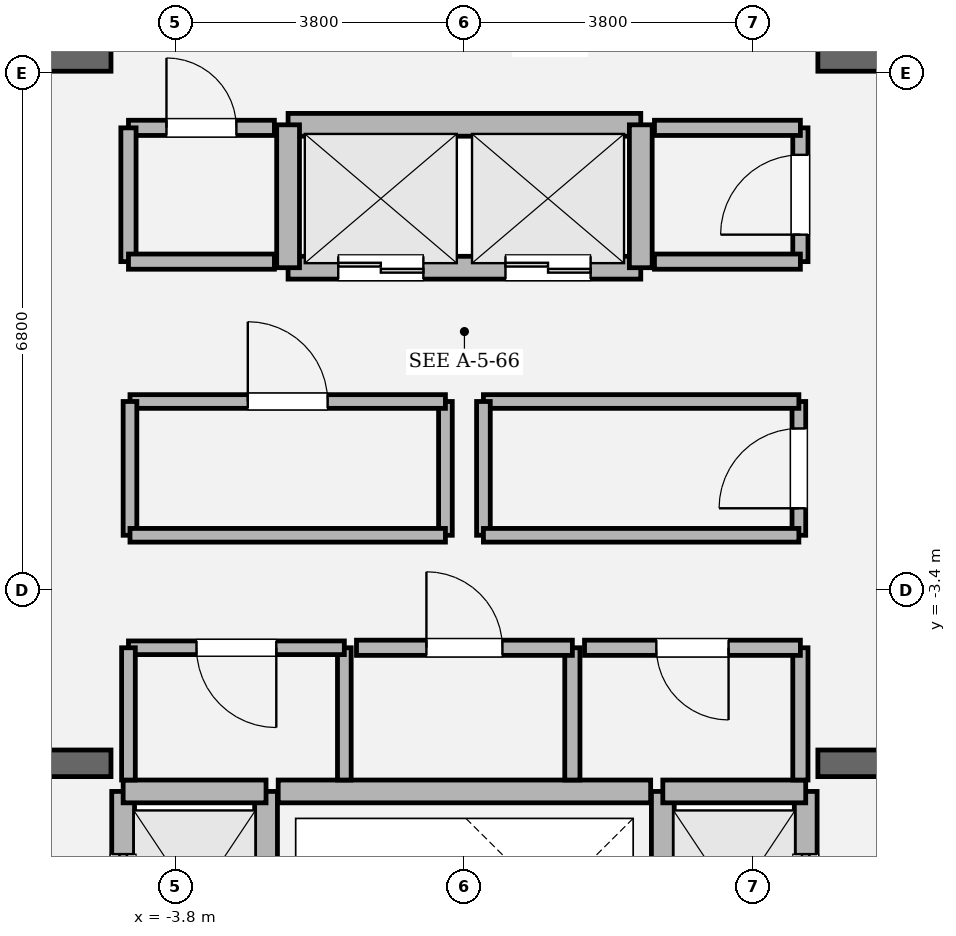
"""IFC4 building model, lengths in metres.
Left out: names, types, materials, properties, quantities, classifications, styles, units other than length and angle.
Written with IfcOpenShell. Run it as: python <this file> out.ifc"""

import sys

from ifc_helpers import new_model, si_unit, direction, frame, frame_2d, origin, place, context, subcontext, project, spatial, rectangle, extrude, element, fill, save


model = new_model("IFC4")
c1 = context("Model", 3, precision=1e-05, world=origin(), true_north=direction((0.0, 1.0)))
c2 = subcontext(c1, "Body", "Model", "MODEL_VIEW")
j1 = project(units=[si_unit("LENGTHUNIT", "METRE"), si_unit("PLANEANGLEUNIT", "RADIAN")], contexts=[c1])
p1 = place(None, origin())
s1 = spatial("IfcSite", under=j1, at=p1, CompositionType="ELEMENT")
p2 = place(p1, origin())
s2 = spatial("IfcBuilding", under=s1, at=p2, CompositionType="ELEMENT")
p3 = place(p2, frame((0.0, 0.0, 317.4)))
s3 = spatial("IfcBuildingStorey", under=s2, at=p3, CompositionType="ELEMENT", Elevation=317.4)
p4 = place(p3, frame((-9.975, -5.68, 0.0), z_axis=(0.0, 0.0, 1.0), x_axis=(1.0, 0.0, 0.0)))
e1 = element("IfcWall", 1, at=p4, inside=s3, PredefinedType="SOLIDWALL", context=c2, shape_type="SweptSolid", body=[
    extrude(rectangle(XDim=5.325, YDim=0.35, at=frame_2d((2.663, 0.0))), origin(), (0.0, 0.0, 1.0), 4.2),
])
p5 = place(p4, frame((1.435, 0.0, 0.0)))
e2 = element("IfcOpeningElement", 2, at=p5, cuts=e1, PredefinedType="OPENING", context=c2, shape_type="SweptSolid", body=[
    extrude(rectangle(XDim=1.18, YDim=2.2, at=frame_2d((0.59, 1.1))), frame((0.0, 0.185, 0.0), z_axis=(0.0, -1.0, 0.0), x_axis=(1.0, 0.0, 0.0)), (0.0, 0.0, 1.0), 0.37),
])
p6 = place(p3, frame((4.65, -5.68, 0.0), z_axis=(0.0, 0.0, 1.0), x_axis=(1.0, 0.0, 0.0)))
e3 = element("IfcWall", 3, at=p6, inside=s3, PredefinedType="SOLIDWALL", context=c2, shape_type="SweptSolid", body=[
    extrude(rectangle(XDim=5.325, YDim=0.35, at=frame_2d((2.663, 0.0))), origin(), (0.0, 0.0, 1.0), 4.2),
])
p7 = place(p6, frame((2.71, 0.0, 0.0)))
e4 = element("IfcOpeningElement", 4, at=p7, cuts=e3, PredefinedType="OPENING", context=c2, shape_type="SweptSolid", body=[
    extrude(rectangle(XDim=1.18, YDim=2.2, at=frame_2d((0.59, 1.1))), frame((0.0, 0.185, 0.0), z_axis=(0.0, -1.0, 0.0), x_axis=(1.0, 0.0, 0.0)), (0.0, 0.0, 1.0), 0.37),
])
for number, where, z_axis, x_axis in (
    (5, (-9.975, 3.6, 0.0), (0.0, 0.0, 1.0), (1.0, 0.0, 0.0)),
    (6, (4.65, 3.6, 0.0), (0.0, 0.0, 1.0), (1.0, 0.0, 0.0)),
):
    element("IfcWall", number, at=place(p3, frame(where, z_axis=z_axis, x_axis=x_axis)), inside=s3, PredefinedType="SOLIDWALL", context=c2, shape_type="SweptSolid", body=[
        extrude(rectangle(XDim=5.325, YDim=0.35, at=frame_2d((2.663, 0.0))), origin(), (0.0, 0.0, 1.0), 4.2),
    ])
p8 = place(p3, frame((-4.49, -8.82, 0.0), z_axis=(0.0, 0.0, 1.0), x_axis=(0.0, 1.0, 0.0)))
e7 = element("IfcWall", 7, at=p8, inside=s3, PredefinedType="SOLIDWALL", context=c2, shape_type="SweptSolid", body=[
    extrude(rectangle(XDim=2.77, YDim=0.3, at=frame_2d((1.385, 0.0))), origin(), (0.0, 0.0, 1.0), 4.0),
])
p9 = place(p8, frame((0.825, 0.0, 0.0)))
e8 = element("IfcOpeningElement", 8, at=p9, cuts=e7, PredefinedType="OPENING", context=c2, shape_type="SweptSolid", body=[
    extrude(rectangle(XDim=1.12, YDim=2.25, at=frame_2d((0.56, 1.125))), frame((0.0, 0.16, 0.0), z_axis=(0.0, -1.0, 0.0), x_axis=(1.0, 0.0, 0.0)), (0.0, 0.0, 1.0), 0.32),
])
p10 = place(p3, frame((-2.61, -8.82, 0.0), z_axis=(0.0, 0.0, 1.0), x_axis=(0.0, 1.0, 0.0)))
e9 = element("IfcWall", 9, at=p10, inside=s3, PredefinedType="SOLIDWALL", context=c2, shape_type="SweptSolid", body=[
    extrude(rectangle(XDim=2.77, YDim=0.3, at=frame_2d((1.385, 0.0))), origin(), (0.0, 0.0, 1.0), 4.0),
])
p11 = place(p3, frame((-4.49, -6.05, 0.0), z_axis=(0.0, 0.0, 1.0), x_axis=(1.0, 0.0, 0.0)))
e10 = element("IfcWall", 10, at=p11, inside=s3, PredefinedType="SOLIDWALL", context=c2, shape_type="SweptSolid", body=[
    extrude(rectangle(XDim=1.88, YDim=0.3, at=frame_2d((0.94, 0.0))), origin(), (0.0, 0.0, 1.0), 4.0),
])
p12 = place(p3, frame((4.49, -8.82, 0.0), z_axis=(0.0, 0.0, 1.0), x_axis=(0.0, 1.0, 0.0)))
e11 = element("IfcWall", 11, at=p12, inside=s3, PredefinedType="SOLIDWALL", context=c2, shape_type="SweptSolid", body=[
    extrude(rectangle(XDim=2.77, YDim=0.3, at=frame_2d((1.385, 0.0))), origin(), (0.0, 0.0, 1.0), 4.0),
])
p13 = place(p12, frame((0.825, 0.0, 0.0)))
e12 = element("IfcOpeningElement", 12, at=p13, cuts=e11, PredefinedType="OPENING", context=c2, shape_type="SweptSolid", body=[
    extrude(rectangle(XDim=1.12, YDim=2.25, at=frame_2d((0.56, 1.125))), frame((0.0, 0.16, 0.0), z_axis=(0.0, -1.0, 0.0), x_axis=(1.0, 0.0, 0.0)), (0.0, 0.0, 1.0), 0.32),
])
p14 = place(p3, frame((2.61, -8.82, 0.0), z_axis=(0.0, 0.0, 1.0), x_axis=(0.0, 1.0, 0.0)))
e13 = element("IfcWall", 13, at=p14, inside=s3, PredefinedType="SOLIDWALL", context=c2, shape_type="SweptSolid", body=[
    extrude(rectangle(XDim=2.77, YDim=0.3, at=frame_2d((1.385, 0.0))), origin(), (0.0, 0.0, 1.0), 4.0),
])
p15 = place(p3, frame((2.61, -6.05, 0.0), z_axis=(0.0, 0.0, 1.0), x_axis=(1.0, 0.0, 0.0)))
e14 = element("IfcWall", 14, at=p15, inside=s3, PredefinedType="SOLIDWALL", context=c2, shape_type="SweptSolid", body=[
    extrude(rectangle(XDim=1.88, YDim=0.3, at=frame_2d((0.94, 0.0))), origin(), (0.0, 0.0, 1.0), 4.0),
])
p16 = place(p3, frame((-2.32, 0.84, 0.0), z_axis=(0.0, 0.0, 1.0), x_axis=(1.0, 0.0, 0.0)))
e15 = element("IfcWall", 15, at=p16, inside=s3, PredefinedType="SOLIDWALL", context=c2, shape_type="SweptSolid", body=[
    extrude(rectangle(XDim=4.64, YDim=0.3, at=frame_2d((2.32, 0.0))), origin(), (0.0, 0.0, 1.0), 4.0),
])
p17 = place(p16, frame((0.66, 0.0, 0.0)))
e16 = element("IfcOpeningElement", 16, at=p17, cuts=e15, PredefinedType="OPENING", context=c2, shape_type="SweptSolid", body=[
    extrude(rectangle(XDim=1.12, YDim=2.25, at=frame_2d((0.56, 1.125))), frame((0.0, 0.16, 0.0), z_axis=(0.0, -1.0, 0.0), x_axis=(1.0, 0.0, 0.0)), (0.0, 0.0, 1.0), 0.32),
])
p18 = place(p16, frame((2.86, 0.0, 0.0)))
e17 = element("IfcOpeningElement", 17, at=p18, cuts=e15, PredefinedType="OPENING", context=c2, shape_type="SweptSolid", body=[
    extrude(rectangle(XDim=1.12, YDim=2.25, at=frame_2d((0.56, 1.125))), frame((0.0, 0.16, 0.0), z_axis=(0.0, -1.0, 0.0), x_axis=(1.0, 0.0, 0.0)), (0.0, 0.0, 1.0), 0.32),
])
p19 = place(p3, frame((-2.32, 2.72, 0.0), z_axis=(0.0, 0.0, 1.0), x_axis=(1.0, 0.0, 0.0)))
e18 = element("IfcWall", 18, at=p19, inside=s3, PredefinedType="SOLIDWALL", context=c2, shape_type="SweptSolid", body=[
    extrude(rectangle(XDim=4.64, YDim=0.3, at=frame_2d((2.32, 0.0))), origin(), (0.0, 0.0, 1.0), 4.0),
])
for number, where, z_axis, x_axis in (
    (19, (-2.32, 0.84, 0.0), (0.0, 0.0, 1.0), (0.0, 1.0, 0.0)),
    (20, (2.32, 0.84, 0.0), (0.0, 0.0, 1.0), (0.0, 1.0, 0.0)),
):
    element("IfcWall", number, at=place(p3, frame(where, z_axis=z_axis, x_axis=x_axis)), inside=s3, PredefinedType="SOLIDWALL", context=c2, shape_type="SweptSolid", body=[
        extrude(rectangle(XDim=1.88, YDim=0.3, at=frame_2d((0.94, 0.0))), origin(), (0.0, 0.0, 1.0), 4.0),
    ])
p20 = place(p3, frame((-2.45, -6.05, 0.0), z_axis=(0.0, 0.0, 1.0), x_axis=(1.0, 0.0, 0.0)))
e21 = element("IfcWall", 21, at=p20, inside=s3, PredefinedType="SOLIDWALL", context=c2, shape_type="SweptSolid", body=[
    extrude(rectangle(XDim=4.9, YDim=0.3, at=frame_2d((2.45, 0.0))), origin(), (0.0, 0.0, 1.0), 4.0),
])
p21 = place(p3, frame((-1.58, -5.9, 0.0), z_axis=(0.0, 0.0, 1.0), x_axis=(0.0, 1.0, 0.0)))
e22 = element("IfcWall", 22, at=p21, inside=s3, PredefinedType="PARTITIONING", context=c2, shape_type="SweptSolid", body=[
    extrude(rectangle(XDim=1.74, YDim=0.18, at=frame_2d((0.87, 0.0))), origin(), (0.0, 0.0, 1.0), 4.0),
])
p22 = place(p3, frame((-1.58, -4.16, 0.0), z_axis=(0.0, 0.0, 1.0), x_axis=(-1.0, 0.0, 0.0)))
e23 = element("IfcWall", 23, at=p22, inside=s3, PredefinedType="PARTITIONING", context=c2, shape_type="SweptSolid", body=[
    extrude(rectangle(XDim=2.84, YDim=0.18, at=frame_2d((1.42, 0.0))), origin(), (0.0, 0.0, 1.0), 4.0),
])
p23 = place(p22, frame((0.895, 0.0, 0.0)))
e24 = element("IfcOpeningElement", 24, at=p23, cuts=e23, PredefinedType="OPENING", context=c2, shape_type="SweptSolid", body=[
    extrude(rectangle(XDim=1.05, YDim=2.2, at=frame_2d((0.525, 1.1))), frame((0.0, 0.1, 0.0), z_axis=(0.0, -1.0, 0.0), x_axis=(1.0, 0.0, 0.0)), (0.0, 0.0, 1.0), 0.2),
])
p24 = place(p3, frame((-4.42, -4.16, 0.0), z_axis=(0.0, 0.0, 1.0), x_axis=(0.0, -1.0, 0.0)))
e25 = element("IfcWall", 25, at=p24, inside=s3, PredefinedType="PARTITIONING", context=c2, shape_type="SweptSolid", body=[
    extrude(rectangle(XDim=1.74, YDim=0.18, at=frame_2d((0.87, 0.0))), origin(), (0.0, 0.0, 1.0), 4.0),
])
p25 = place(p3, frame((1.42, -5.9, 0.0), z_axis=(0.0, 0.0, 1.0), x_axis=(0.0, 1.0, 0.0)))
e26 = element("IfcWall", 26, at=p25, inside=s3, PredefinedType="SOLIDWALL", context=c2, shape_type="SweptSolid", body=[
    extrude(rectangle(XDim=1.74, YDim=0.2, at=frame_2d((0.87, 0.0))), origin(), (0.0, 0.0, 1.0), 4.0),
])
p26 = place(p3, frame((1.42, -4.16, 0.0), z_axis=(0.0, 0.0, 1.0), x_axis=(-1.0, 0.0, 0.0)))
e27 = element("IfcWall", 27, at=p26, inside=s3, PredefinedType="SOLIDWALL", context=c2, shape_type="SweptSolid", body=[
    extrude(rectangle(XDim=2.84, YDim=0.2, at=frame_2d((1.42, 0.0))), origin(), (0.0, 0.0, 1.0), 4.0),
])
p27 = place(p26, frame((0.92, 0.0, 0.0)))
e28 = element("IfcOpeningElement", 28, at=p27, cuts=e27, PredefinedType="OPENING", context=c2, shape_type="SweptSolid", body=[
    extrude(rectangle(XDim=1.0, YDim=2.15, at=frame_2d((0.5, 1.075))), frame((0.0, 0.11, 0.0), z_axis=(0.0, -1.0, 0.0), x_axis=(1.0, 0.0, 0.0)), (0.0, 0.0, 1.0), 0.22),
])
p28 = place(p3, frame((4.42, -5.9, 0.0), z_axis=(0.0, 0.0, 1.0), x_axis=(0.0, 1.0, 0.0)))
e29 = element("IfcWall", 29, at=p28, inside=s3, PredefinedType="SOLIDWALL", context=c2, shape_type="SweptSolid", body=[
    extrude(rectangle(XDim=1.74, YDim=0.2, at=frame_2d((0.87, 0.0))), origin(), (0.0, 0.0, 1.0), 4.0),
])
p29 = place(p3, frame((4.42, -4.16, 0.0), z_axis=(0.0, 0.0, 1.0), x_axis=(-1.0, 0.0, 0.0)))
e30 = element("IfcWall", 30, at=p29, inside=s3, PredefinedType="SOLIDWALL", context=c2, shape_type="SweptSolid", body=[
    extrude(rectangle(XDim=2.84, YDim=0.2, at=frame_2d((1.42, 0.0))), origin(), (0.0, 0.0, 1.0), 4.0),
])
p30 = place(p29, frame((0.945, 0.0, 0.0)))
e31 = element("IfcOpeningElement", 31, at=p30, cuts=e30, PredefinedType="OPENING", context=c2, shape_type="SweptSolid", body=[
    extrude(rectangle(XDim=0.95, YDim=2.15, at=frame_2d((0.475, 1.075))), frame((0.0, 0.11, 0.0), z_axis=(0.0, -1.0, 0.0), x_axis=(1.0, 0.0, 0.0)), (0.0, 0.0, 1.0), 0.22),
])
p31 = place(p3, frame((-0.25, -2.68, 0.0), z_axis=(0.0, 0.0, 1.0), x_axis=(0.0, 1.0, 0.0)))
e32 = element("IfcWall", 32, at=p31, inside=s3, PredefinedType="PARTITIONING", context=c2, shape_type="SweptSolid", body=[
    extrude(rectangle(XDim=1.76, YDim=0.18, at=frame_2d((0.88, 0.0))), origin(), (0.0, 0.0, 1.0), 4.0),
])
p32 = place(p3, frame((-0.25, -0.92, 0.0), z_axis=(0.0, 0.0, 1.0), x_axis=(-1.0, 0.0, 0.0)))
e33 = element("IfcWall", 33, at=p32, inside=s3, PredefinedType="PARTITIONING", context=c2, shape_type="SweptSolid", body=[
    extrude(rectangle(XDim=4.15, YDim=0.18, at=frame_2d((2.075, 0.0))), origin(), (0.0, 0.0, 1.0), 4.0),
])
p33 = place(p32, frame((1.55, 0.0, 0.0)))
e34 = element("IfcOpeningElement", 34, at=p33, cuts=e33, PredefinedType="OPENING", context=c2, shape_type="SweptSolid", body=[
    extrude(rectangle(XDim=1.05, YDim=2.2, at=frame_2d((0.525, 1.1))), frame((0.0, 0.1, 0.0), z_axis=(0.0, -1.0, 0.0), x_axis=(1.0, 0.0, 0.0)), (0.0, 0.0, 1.0), 0.2),
])
p34 = place(p3, frame((-4.4, -0.92, 0.0), z_axis=(0.0, 0.0, 1.0), x_axis=(0.0, -1.0, 0.0)))
e35 = element("IfcWall", 35, at=p34, inside=s3, PredefinedType="PARTITIONING", context=c2, shape_type="SweptSolid", body=[
    extrude(rectangle(XDim=1.76, YDim=0.18, at=frame_2d((0.88, 0.0))), origin(), (0.0, 0.0, 1.0), 4.0),
])
p35 = place(p3, frame((-4.4, -2.68, 0.0), z_axis=(0.0, 0.0, 1.0), x_axis=(1.0, 0.0, 0.0)))
e36 = element("IfcWall", 36, at=p35, inside=s3, PredefinedType="PARTITIONING", context=c2, shape_type="SweptSolid", body=[
    extrude(rectangle(XDim=4.15, YDim=0.18, at=frame_2d((2.075, 0.0))), origin(), (0.0, 0.0, 1.0), 4.0),
])
p36 = place(p3, frame((4.4, -2.68, 0.0), z_axis=(0.0, 0.0, 1.0), x_axis=(0.0, 1.0, 0.0)))
e37 = element("IfcWall", 37, at=p36, inside=s3, PredefinedType="PARTITIONING", context=c2, shape_type="SweptSolid", body=[
    extrude(rectangle(XDim=1.76, YDim=0.18, at=frame_2d((0.88, 0.0))), origin(), (0.0, 0.0, 1.0), 4.0),
])
p37 = place(p36, frame((0.355, 0.0, 0.0)))
e38 = element("IfcOpeningElement", 38, at=p37, cuts=e37, PredefinedType="OPENING", context=c2, shape_type="SweptSolid", body=[
    extrude(rectangle(XDim=1.05, YDim=2.2, at=frame_2d((0.525, 1.1))), frame((0.0, 0.1, 0.0), z_axis=(0.0, -1.0, 0.0), x_axis=(1.0, 0.0, 0.0)), (0.0, 0.0, 1.0), 0.2),
])
p38 = place(p3, frame((4.4, -0.92, 0.0), z_axis=(0.0, 0.0, 1.0), x_axis=(-1.0, 0.0, 0.0)))
e39 = element("IfcWall", 39, at=p38, inside=s3, PredefinedType="PARTITIONING", context=c2, shape_type="SweptSolid", body=[
    extrude(rectangle(XDim=4.15, YDim=0.18, at=frame_2d((2.075, 0.0))), origin(), (0.0, 0.0, 1.0), 4.0),
])
p39 = place(p3, frame((0.25, -0.92, 0.0), z_axis=(0.0, 0.0, 1.0), x_axis=(0.0, -1.0, 0.0)))
e40 = element("IfcWall", 40, at=p39, inside=s3, PredefinedType="PARTITIONING", context=c2, shape_type="SweptSolid", body=[
    extrude(rectangle(XDim=1.76, YDim=0.18, at=frame_2d((0.88, 0.0))), origin(), (0.0, 0.0, 1.0), 4.0),
])
p40 = place(p3, frame((0.25, -2.68, 0.0), z_axis=(0.0, 0.0, 1.0), x_axis=(1.0, 0.0, 0.0)))
e41 = element("IfcWall", 41, at=p40, inside=s3, PredefinedType="PARTITIONING", context=c2, shape_type="SweptSolid", body=[
    extrude(rectangle(XDim=4.15, YDim=0.18, at=frame_2d((2.075, 0.0))), origin(), (0.0, 0.0, 1.0), 4.0),
])
p41 = place(p3, frame((-2.5, 2.68, 0.0), z_axis=(0.0, 0.0, 1.0), x_axis=(-1.0, 0.0, 0.0)))
e42 = element("IfcWall", 42, at=p41, inside=s3, PredefinedType="SOLIDWALL", context=c2, shape_type="SweptSolid", body=[
    extrude(rectangle(XDim=1.92, YDim=0.2, at=frame_2d((0.96, 0.0))), origin(), (0.0, 0.0, 1.0), 4.0),
])
p42 = place(p41, frame((0.5, 0.0, 0.0)))
e43 = element("IfcOpeningElement", 43, at=p42, cuts=e42, PredefinedType="OPENING", context=c2, shape_type="SweptSolid", body=[
    extrude(rectangle(XDim=0.92, YDim=2.1, at=frame_2d((0.46, 1.05))), frame((0.0, 0.11, 0.0), z_axis=(0.0, -1.0, 0.0), x_axis=(1.0, 0.0, 0.0)), (0.0, 0.0, 1.0), 0.22),
])
p43 = place(p3, frame((-4.42, 2.68, 0.0), z_axis=(0.0, 0.0, 1.0), x_axis=(0.0, -1.0, 0.0)))
e44 = element("IfcWall", 44, at=p43, inside=s3, PredefinedType="SOLIDWALL", context=c2, shape_type="SweptSolid", body=[
    extrude(rectangle(XDim=1.76, YDim=0.2, at=frame_2d((0.88, 0.0))), origin(), (0.0, 0.0, 1.0), 4.0),
])
p44 = place(p3, frame((-4.42, 0.92, 0.0), z_axis=(0.0, 0.0, 1.0), x_axis=(1.0, 0.0, 0.0)))
e45 = element("IfcWall", 45, at=p44, inside=s3, PredefinedType="SOLIDWALL", context=c2, shape_type="SweptSolid", body=[
    extrude(rectangle(XDim=1.92, YDim=0.2, at=frame_2d((0.96, 0.0))), origin(), (0.0, 0.0, 1.0), 4.0),
])
p45 = place(p3, frame((4.42, 0.92, 0.0), z_axis=(0.0, 0.0, 1.0), x_axis=(0.0, 1.0, 0.0)))
e46 = element("IfcWall", 46, at=p45, inside=s3, PredefinedType="SOLIDWALL", context=c2, shape_type="SweptSolid", body=[
    extrude(rectangle(XDim=1.76, YDim=0.2, at=frame_2d((0.88, 0.0))), origin(), (0.0, 0.0, 1.0), 4.0),
])
p46 = place(p45, frame((0.355, 0.0, 0.0)))
e47 = element("IfcOpeningElement", 47, at=p46, cuts=e46, PredefinedType="OPENING", context=c2, shape_type="SweptSolid", body=[
    extrude(rectangle(XDim=1.05, YDim=2.2, at=frame_2d((0.525, 1.1))), frame((0.0, 0.11, 0.0), z_axis=(0.0, -1.0, 0.0), x_axis=(1.0, 0.0, 0.0)), (0.0, 0.0, 1.0), 0.22),
])
for number, where, z_axis, x_axis in (
    (48, (4.42, 2.68, 0.0), (0.0, 0.0, 1.0), (-1.0, 0.0, 0.0)),
    (49, (2.5, 0.92, 0.0), (0.0, 0.0, 1.0), (1.0, 0.0, 0.0)),
):
    element("IfcWall", number, at=place(p3, frame(where, z_axis=z_axis, x_axis=x_axis)), inside=s3, PredefinedType="SOLIDWALL", context=c2, shape_type="SweptSolid", body=[
        extrude(rectangle(XDim=1.92, YDim=0.2, at=frame_2d((0.96, 0.0))), origin(), (0.0, 0.0, 1.0), 4.0),
    ])
p47 = place(p9, origin())
e50 = element("IfcDoor", 50, at=p47, inside=s3, OperationType="SLIDING_TO_LEFT", PredefinedType="DOOR", context=c2, shape_type="SweptSolid", body=[
    extrude(rectangle(XDim=1.12, YDim=2.25, at=frame_2d((0.56, 1.125))), frame((0.0, 0.025, 0.0), z_axis=(0.0, -1.0, 0.0), x_axis=(1.0, 0.0, 0.0)), (0.0, 0.0, 1.0), 0.05),
])
fill(e8, e50)
p48 = place(p13, origin())
e51 = element("IfcDoor", 51, at=p48, inside=s3, OperationType="SLIDING_TO_RIGHT", PredefinedType="DOOR", context=c2, shape_type="SweptSolid", body=[
    extrude(rectangle(XDim=1.12, YDim=2.25, at=frame_2d((0.56, 1.125))), frame((0.0, 0.025, 0.0), z_axis=(0.0, -1.0, 0.0), x_axis=(1.0, 0.0, 0.0)), (0.0, 0.0, 1.0), 0.05),
])
fill(e12, e51)
p49 = place(p17, origin())
e52 = element("IfcDoor", 52, at=p49, inside=s3, OperationType="DOUBLE_DOOR_SLIDING", PredefinedType="DOOR", context=c2, shape_type="SweptSolid", body=[
    extrude(rectangle(XDim=1.12, YDim=2.25, at=frame_2d((0.56, 1.125))), frame((0.0, 0.025, 0.0), z_axis=(0.0, -1.0, 0.0), x_axis=(1.0, 0.0, 0.0)), (0.0, 0.0, 1.0), 0.05),
])
fill(e16, e52)
p50 = place(p18, origin())
e53 = element("IfcDoor", 53, at=p50, inside=s3, OperationType="DOUBLE_DOOR_SLIDING", PredefinedType="DOOR", context=c2, shape_type="SweptSolid", body=[
    extrude(rectangle(XDim=1.12, YDim=2.25, at=frame_2d((0.56, 1.125))), frame((0.0, 0.025, 0.0), z_axis=(0.0, -1.0, 0.0), x_axis=(1.0, 0.0, 0.0)), (0.0, 0.0, 1.0), 0.05),
])
fill(e17, e53)
p51 = place(p23, origin())
e54 = element("IfcDoor", 54, at=p51, inside=s3, OperationType="SINGLE_SWING_LEFT", PredefinedType="DOOR", context=c2, shape_type="SweptSolid", body=[
    extrude(rectangle(XDim=1.05, YDim=2.2, at=frame_2d((0.525, 1.1))), frame((0.0, 0.025, 0.0), z_axis=(0.0, -1.0, 0.0), x_axis=(1.0, 0.0, 0.0)), (0.0, 0.0, 1.0), 0.05),
])
fill(e24, e54)
p52 = place(p27, origin())
e55 = element("IfcDoor", 55, at=p52, inside=s3, OperationType="SINGLE_SWING_RIGHT", PredefinedType="DOOR", context=c2, shape_type="SweptSolid", body=[
    extrude(rectangle(XDim=1.0, YDim=2.15, at=frame_2d((0.5, 1.075))), frame((0.0, 0.025, 0.0), z_axis=(0.0, -1.0, 0.0), x_axis=(1.0, 0.0, 0.0)), (0.0, 0.0, 1.0), 0.05),
])
fill(e28, e55)
p53 = place(p30, origin())
e56 = element("IfcDoor", 56, at=p53, inside=s3, OperationType="SINGLE_SWING_LEFT", PredefinedType="DOOR", context=c2, shape_type="SweptSolid", body=[
    extrude(rectangle(XDim=0.95, YDim=2.15, at=frame_2d((0.475, 1.075))), frame((0.0, 0.025, 0.0), z_axis=(0.0, -1.0, 0.0), x_axis=(1.0, 0.0, 0.0)), (0.0, 0.0, 1.0), 0.05),
])
fill(e31, e56)
p54 = place(p33, origin())
e57 = element("IfcDoor", 57, at=p54, inside=s3, OperationType="SINGLE_SWING_RIGHT", PredefinedType="DOOR", context=c2, shape_type="SweptSolid", body=[
    extrude(rectangle(XDim=1.05, YDim=2.2, at=frame_2d((0.525, 1.1))), frame((0.0, 0.025, 0.0), z_axis=(0.0, -1.0, 0.0), x_axis=(1.0, 0.0, 0.0)), (0.0, 0.0, 1.0), 0.05),
])
fill(e34, e57)
p55 = place(p37, origin())
e58 = element("IfcDoor", 58, at=p55, inside=s3, OperationType="SINGLE_SWING_LEFT", PredefinedType="DOOR", context=c2, shape_type="SweptSolid", body=[
    extrude(rectangle(XDim=1.05, YDim=2.2, at=frame_2d((0.525, 1.1))), frame((0.0, 0.025, 0.0), z_axis=(0.0, -1.0, 0.0), x_axis=(1.0, 0.0, 0.0)), (0.0, 0.0, 1.0), 0.05),
])
fill(e38, e58)
p56 = place(p42, origin())
e59 = element("IfcDoor", 59, at=p56, inside=s3, OperationType="SINGLE_SWING_RIGHT", PredefinedType="DOOR", context=c2, shape_type="SweptSolid", body=[
    extrude(rectangle(XDim=0.92, YDim=2.1, at=frame_2d((0.46, 1.05))), frame((0.0, 0.025, 0.0), z_axis=(0.0, -1.0, 0.0), x_axis=(1.0, 0.0, 0.0)), (0.0, 0.0, 1.0), 0.05),
])
fill(e43, e59)
p57 = place(p46, origin())
e60 = element("IfcDoor", 60, at=p57, inside=s3, OperationType="SINGLE_SWING_LEFT", PredefinedType="DOOR", context=c2, shape_type="SweptSolid", body=[
    extrude(rectangle(XDim=1.05, YDim=2.2, at=frame_2d((0.525, 1.1))), frame((0.0, 0.025, 0.0), z_axis=(0.0, -1.0, 0.0), x_axis=(1.0, 0.0, 0.0)), (0.0, 0.0, 1.0), 0.05),
])
fill(e47, e60)
save(model, sys.argv[1])
